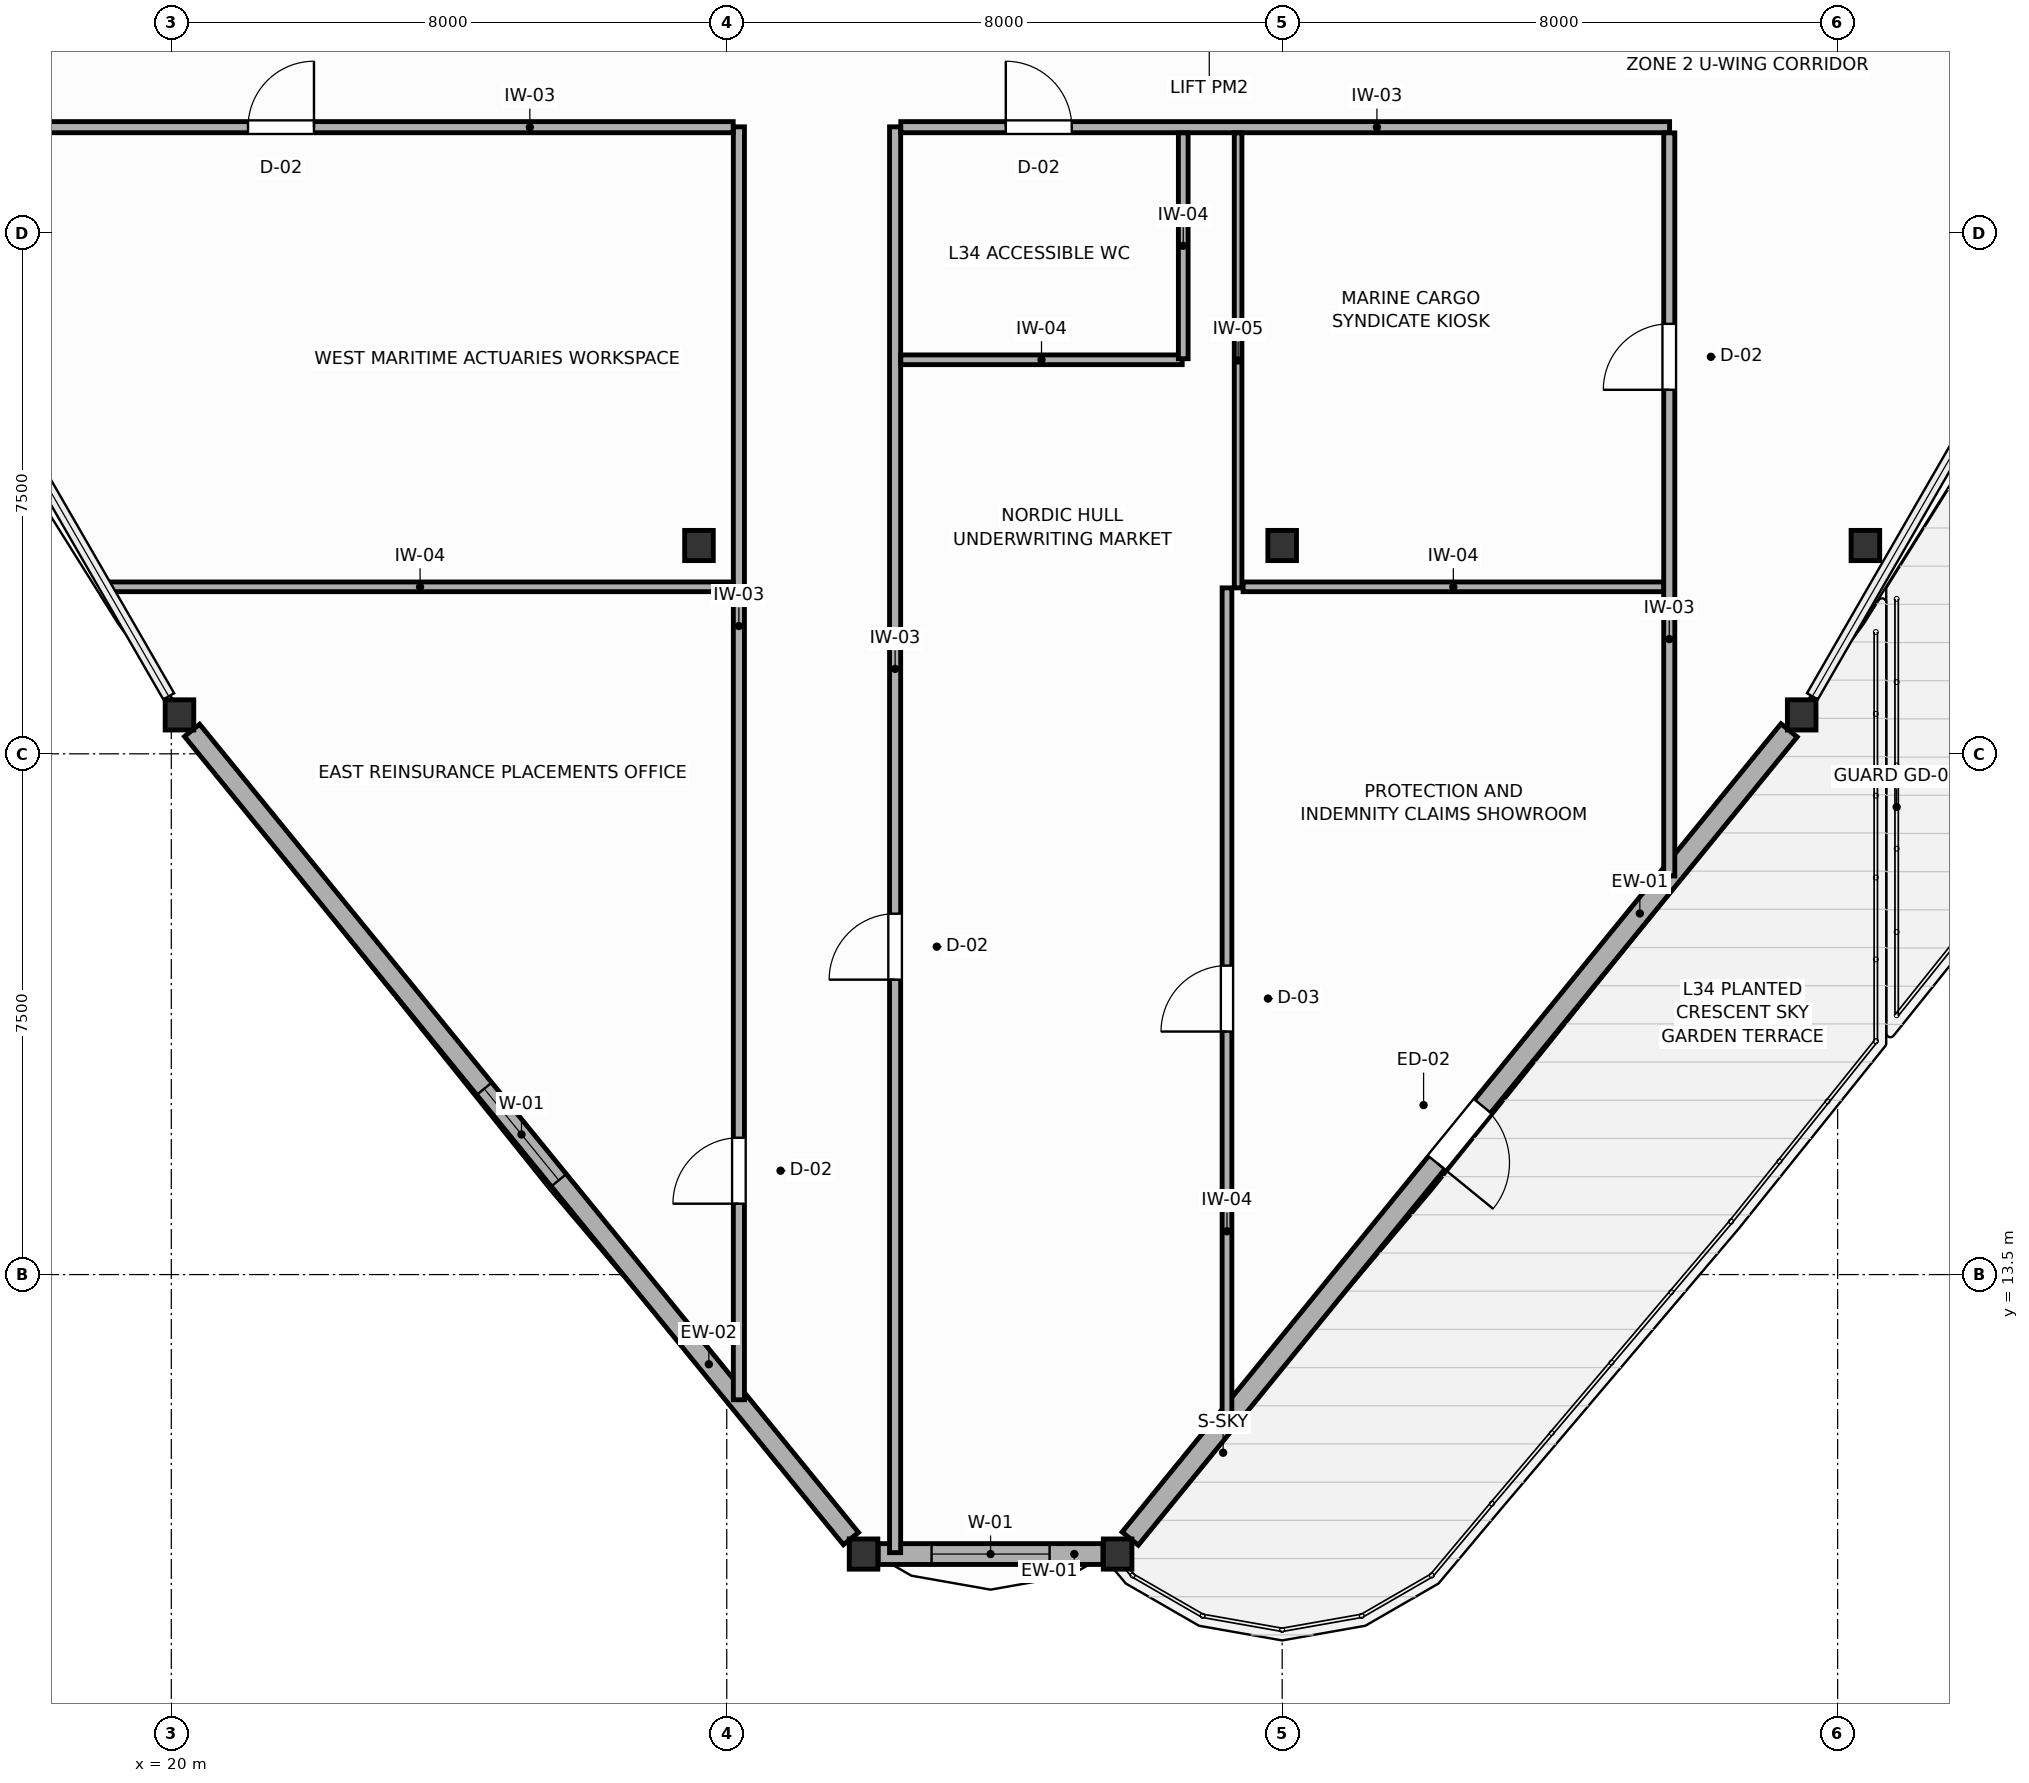
"""IFC4 building model, lengths in metres.
Left out: names, types, materials, properties, quantities, classifications, styles, units other than length and angle.
Written with IfcOpenShell. Run it as: python <this file> out.ifc"""

import sys

from ifc_helpers import new_model, si_unit, direction, frame, frame_2d, origin, origin_2d, place, context, subcontext, project, spatial, rectangle, i_section, extrude, source, transform, mapped, element, fill, save


model = new_model("IFC4")
c1 = context("Model", 3, precision=1e-05, world=origin(), true_north=direction((0.0, 1.0)))
c2 = subcontext(c1, "Body", "Model", "MODEL_VIEW")
j1 = project(units=[si_unit("LENGTHUNIT", "METRE"), si_unit("PLANEANGLEUNIT", "RADIAN")], contexts=[c1])
p1 = place(None, origin())
s1 = spatial("IfcSite", under=j1, at=p1, CompositionType="ELEMENT")
p2 = place(p1, origin())
s2 = spatial("IfcBuilding", under=s1, at=p2, CompositionType="ELEMENT")
p3 = place(p2, frame((0.0, 0.0, 136.2)))
s3 = spatial("IfcBuildingStorey", under=s2, at=p3, CompositionType="ELEMENT", Elevation=136.2)
m1 = source(origin(), c2, "Body", "SweptSolid", [
    extrude(i_section(OverallWidth=0.412, OverallDepth=0.435, WebThickness=0.033, FlangeThickness=0.053, FilletRadius=0.015, at=origin_2d()), origin(), (0.0, 0.0, 1.0), 3.6),
])
for number, where, z_axis, x_axis in (
    (1, (27.6, 24.0, 0.0), (0.0, 0.0, 1.0), (1.0, 0.0, 0.0)),
    (2, (44.4, 24.0, 0.0), (0.0, 0.0, 1.0), (1.0, 0.0, 0.0)),
    (3, (36.0, 24.0, 0.0), (0.0, 0.0, 1.0), (1.0, 0.0, 0.0)),
    (4, (20.118, 21.561, 0.0), (0.0, 0.0, 1.0), (1.0, 0.0, 0.0)),
    (5, (29.97, 9.475, 0.0), (0.0, 0.0, 1.0), (1.0, 0.0, 0.0)),
    (6, (33.63, 9.475, 0.0), (0.0, 0.0, 1.0), (1.0, 0.0, 0.0)),
    (7, (43.482, 21.561, 0.0), (0.0, 0.0, 1.0), (1.0, 0.0, 0.0)),
):
    element("IfcColumn", number, at=place(p3, frame(where, z_axis=z_axis, x_axis=x_axis)), inside=s3, PredefinedType="COLUMN", context=c2, shape_type="MappedRepresentation", body=[
        mapped(m1, transform((0.0, 0.0, 0.0), scale=1.0)),
    ])
p4 = place(p3, frame((20.299, 21.338, 0.0), z_axis=(0.0, 0.0, 1.0), x_axis=(0.631872666528, -0.775072211665, 0.0)))
e8 = element("IfcWall", 8, at=p4, inside=s3, PredefinedType="SOLIDWALL", context=c2, shape_type="SweptSolid", body=[
    extrude(rectangle(XDim=15.019, YDim=0.28, at=frame_2d((7.509, 0.0))), origin(), (0.0, 0.0, 1.0), 3.0),
])
p5 = place(p4, frame((6.659, 0.0, 0.75)))
e9 = element("IfcOpeningElement", 9, at=p5, cuts=e8, PredefinedType="OPENING", context=c2, shape_type="SweptSolid", body=[
    extrude(rectangle(XDim=1.7, YDim=1.75, at=frame_2d((0.85, 0.875))), frame((0.0, 0.15, 0.0), z_axis=(0.0, -1.0, 0.0), x_axis=(1.0, 0.0, 0.0)), (0.0, 0.0, 1.0), 0.3),
])
p6 = place(p3, frame((30.181, 9.475, 0.0), z_axis=(0.0, 0.0, 1.0), x_axis=(1.0, 0.0, 0.0)))
e10 = element("IfcWall", 10, at=p6, inside=s3, PredefinedType="SOLIDWALL", context=c2, shape_type="SweptSolid", body=[
    extrude(rectangle(XDim=3.237, YDim=0.3, at=frame_2d((1.619, 0.0))), origin(), (0.0, 0.0, 1.0), 3.0),
])
p7 = place(p6, frame((0.769, 0.0, 0.75)))
e11 = element("IfcOpeningElement", 11, at=p7, cuts=e10, PredefinedType="OPENING", context=c2, shape_type="SweptSolid", body=[
    extrude(rectangle(XDim=1.7, YDim=1.75, at=frame_2d((0.85, 0.875))), frame((0.0, 0.16, 0.0), z_axis=(0.0, -1.0, 0.0), x_axis=(1.0, 0.0, 0.0)), (0.0, 0.0, 1.0), 0.32),
])
p8 = place(p3, frame((33.811, 9.698, 0.0), z_axis=(0.0, 0.0, 1.0), x_axis=(0.631882431987, 0.775064250334, 0.0)))
e12 = element("IfcWall", 12, at=p8, inside=s3, PredefinedType="SOLIDWALL", context=c2, shape_type="SweptSolid", body=[
    extrude(rectangle(XDim=15.019, YDim=0.3, at=frame_2d((7.509, 0.0))), origin(), (0.0, 0.0, 1.0), 3.0),
])
p9 = place(p8, frame((6.984, 0.0, 0.0)))
e13 = element("IfcOpeningElement", 13, at=p9, cuts=e12, PredefinedType="OPENING", context=c2, shape_type="SweptSolid", body=[
    extrude(rectangle(XDim=1.05, YDim=2.1, at=frame_2d((0.525, 1.05))), frame((0.0, 0.16, 0.0), z_axis=(0.0, -1.0, 0.0), x_axis=(1.0, 0.0, 0.0)), (0.0, 0.0, 1.0), 0.32),
])
p10 = place(p3, frame((30.425, 9.495, 0.0), z_axis=(0.0, 0.0, 1.0), x_axis=(0.0, 1.0, 0.0)))
e14 = element("IfcWall", 14, at=p10, inside=s3, PredefinedType="PARTITIONING", context=c2, shape_type="SweptSolid", body=[
    extrude(rectangle(XDim=20.535, YDim=0.16, at=frame_2d((10.268, 0.0))), origin(), (0.0, 0.0, 1.0), 3.4),
])
p11 = place(p10, frame((8.252, 0.0, 0.0)))
e15 = element("IfcOpeningElement", 15, at=p11, cuts=e14, PredefinedType="OPENING", context=c2, shape_type="SweptSolid", body=[
    extrude(rectangle(XDim=0.95, YDim=2.05, at=frame_2d((0.475, 1.025))), frame((0.0, 0.09, 0.0), z_axis=(0.0, -1.0, 0.0), x_axis=(1.0, 0.0, 0.0)), (0.0, 0.0, 1.0), 0.18),
])
p12 = place(p3, frame((28.175, 11.697, 0.0), z_axis=(0.0, 0.0, 1.0), x_axis=(0.0, 1.0, 0.0)))
e16 = element("IfcWall", 16, at=p12, inside=s3, PredefinedType="PARTITIONING", context=c2, shape_type="SweptSolid", body=[
    extrude(rectangle(XDim=18.333, YDim=0.16, at=frame_2d((9.167, 0.0))), origin(), (0.0, 0.0, 1.0), 2.95),
])
p13 = place(p12, frame((2.824, 0.0, 0.0)))
e17 = element("IfcOpeningElement", 17, at=p13, cuts=e16, PredefinedType="OPENING", context=c2, shape_type="SweptSolid", body=[
    extrude(rectangle(XDim=0.95, YDim=2.05, at=frame_2d((0.475, 1.025))), frame((0.0, 0.09, 0.0), z_axis=(0.0, -1.0, 0.0), x_axis=(1.0, 0.0, 0.0)), (0.0, 0.0, 1.0), 0.18),
])
p14 = place(p3, frame((15.251, 30.025, 0.0), z_axis=(0.0, 0.0, 1.0), x_axis=(1.0, 0.0, 0.0)))
e18 = element("IfcWall", 18, at=p14, inside=s3, PredefinedType="PARTITIONING", context=c2, shape_type="SweptSolid", body=[
    extrude(rectangle(XDim=12.842, YDim=0.16, at=frame_2d((6.421, 0.0))), origin(), (0.0, 0.0, 1.0), 3.4),
])
p15 = place(p14, frame((5.854, 0.0, 0.0)))
e19 = element("IfcOpeningElement", 19, at=p15, cuts=e18, PredefinedType="OPENING", context=c2, shape_type="SweptSolid", body=[
    extrude(rectangle(XDim=0.95, YDim=2.05, at=frame_2d((0.475, 1.025))), frame((0.0, 0.09, 0.0), z_axis=(0.0, -1.0, 0.0), x_axis=(1.0, 0.0, 0.0)), (0.0, 0.0, 1.0), 0.18),
])
p16 = place(p3, frame((30.507, 30.025, 0.0), z_axis=(0.0, 0.0, 1.0), x_axis=(1.0, 0.0, 0.0)))
e20 = element("IfcWall", 20, at=p16, inside=s3, PredefinedType="PARTITIONING", context=c2, shape_type="SweptSolid", body=[
    extrude(rectangle(XDim=11.073, YDim=0.16, at=frame_2d((5.537, 0.0))), origin(), (0.0, 0.0, 1.0), 3.4),
])
p17 = place(p16, frame((1.512, 0.0, 0.0)))
e21 = element("IfcOpeningElement", 21, at=p17, cuts=e20, PredefinedType="OPENING", context=c2, shape_type="SweptSolid", body=[
    extrude(rectangle(XDim=0.95, YDim=2.05, at=frame_2d((0.475, 1.025))), frame((0.0, 0.09, 0.0), z_axis=(0.0, -1.0, 0.0), x_axis=(1.0, 0.0, 0.0)), (0.0, 0.0, 1.0), 0.18),
])
p18 = place(p3, frame((41.575, 19.241, 0.0), z_axis=(0.0, 0.0, 1.0), x_axis=(0.0, 1.0, 0.0)))
e22 = element("IfcWall", 22, at=p18, inside=s3, PredefinedType="PARTITIONING", context=c2, shape_type="SweptSolid", body=[
    extrude(rectangle(XDim=10.702, YDim=0.16, at=frame_2d((5.351, 0.0))), origin(), (0.0, 0.0, 1.0), 3.4),
])
p19 = place(p18, frame((7.002, 0.0, 0.0)))
e23 = element("IfcOpeningElement", 23, at=p19, cuts=e22, PredefinedType="OPENING", context=c2, shape_type="SweptSolid", body=[
    extrude(rectangle(XDim=0.95, YDim=2.05, at=frame_2d((0.475, 1.025))), frame((0.0, 0.09, 0.0), z_axis=(0.0, -1.0, 0.0), x_axis=(1.0, 0.0, 0.0)), (0.0, 0.0, 1.0), 0.18),
])
p20 = place(p3, frame((35.205, 11.427, 0.0), z_axis=(0.0, 0.0, 1.0), x_axis=(0.0, 1.0, 0.0)))
e24 = element("IfcWall", 24, at=p20, inside=s3, PredefinedType="PARTITIONING", context=c2, shape_type="SweptSolid", body=[
    extrude(rectangle(XDim=11.963, YDim=0.14, at=frame_2d((5.981, 0.0))), origin(), (0.0, 0.0, 1.0), 2.95),
])
p21 = place(p20, frame((5.573, 0.0, 0.0)))
e25 = element("IfcOpeningElement", 25, at=p21, cuts=e24, PredefinedType="OPENING", context=c2, shape_type="SweptSolid", body=[
    extrude(rectangle(XDim=0.95, YDim=2.05, at=frame_2d((0.475, 1.025))), frame((0.0, 0.08, 0.0), z_axis=(0.0, -1.0, 0.0), x_axis=(1.0, 0.0, 0.0)), (0.0, 0.0, 1.0), 0.16),
])
p22 = place(p3, frame((19.073, 23.405, 0.0), z_axis=(0.0, 0.0, 1.0), x_axis=(1.0, 0.0, 0.0)))
e26 = element("IfcWall", 26, at=p22, inside=s3, PredefinedType="PARTITIONING", context=c2, shape_type="SweptSolid", body=[
    extrude(rectangle(XDim=9.02, YDim=0.14, at=frame_2d((4.51, 0.0))), origin(), (0.0, 0.0, 1.0), 3.4),
])
p23 = place(p3, frame((35.365, 23.39, 0.0), z_axis=(0.0, 0.0, 1.0), x_axis=(0.0, 1.0, 0.0)))
e27 = element("IfcWall", 27, at=p23, inside=s3, PredefinedType="MOVABLE", context=c2, shape_type="SweptSolid", body=[
    extrude(rectangle(XDim=6.553, YDim=0.11, at=frame_2d((3.277, 0.0))), origin(), (0.0, 0.0, 1.0), 3.4),
])
p24 = place(p3, frame((35.437, 23.405, 0.0), z_axis=(0.0, 0.0, 1.0), x_axis=(1.0, 0.0, 0.0)))
e28 = element("IfcWall", 28, at=p24, inside=s3, PredefinedType="PARTITIONING", context=c2, shape_type="SweptSolid", body=[
    extrude(rectangle(XDim=6.056, YDim=0.14, at=frame_2d((3.028, 0.0))), origin(), (0.0, 0.0, 1.0), 3.4),
])
p25 = place(p3, frame((30.507, 26.675, 0.0), z_axis=(0.0, 0.0, 1.0), x_axis=(1.0, 0.0, 0.0)))
e29 = element("IfcWall", 29, at=p25, inside=s3, PredefinedType="PARTITIONING", context=c2, shape_type="SweptSolid", body=[
    extrude(rectangle(XDim=4.053, YDim=0.14, at=frame_2d((2.026, 0.0))), origin(), (0.0, 0.0, 1.0), 3.4),
])
p26 = place(p3, frame((34.575, 26.69, 0.0), z_axis=(0.0, 0.0, 1.0), x_axis=(0.0, 1.0, 0.0)))
e30 = element("IfcWall", 30, at=p26, inside=s3, PredefinedType="PARTITIONING", context=c2, shape_type="SweptSolid", body=[
    extrude(rectangle(XDim=3.253, YDim=0.14, at=frame_2d((1.626, 0.0))), origin(), (0.0, 0.0, 1.0), 3.4),
])
p27 = place(p5, origin())
e31 = element("IfcWindow", 31, at=p27, inside=s3, PartitioningType="SINGLE_PANEL", PredefinedType="WINDOW", context=c2, shape_type="SweptSolid", body=[
    extrude(rectangle(XDim=1.7, YDim=1.75, at=frame_2d((0.85, 0.875))), frame((0.0, 0.03, 0.0), z_axis=(0.0, -1.0, 0.0), x_axis=(1.0, 0.0, 0.0)), (0.0, 0.0, 1.0), 0.06),
])
fill(e9, e31)
p28 = place(p7, origin())
e32 = element("IfcWindow", 32, at=p28, inside=s3, PartitioningType="SINGLE_PANEL", PredefinedType="WINDOW", context=c2, shape_type="SweptSolid", body=[
    extrude(rectangle(XDim=1.7, YDim=1.75, at=frame_2d((0.85, 0.875))), frame((0.0, 0.03, 0.0), z_axis=(0.0, -1.0, 0.0), x_axis=(1.0, 0.0, 0.0)), (0.0, 0.0, 1.0), 0.06),
])
fill(e11, e32)
p29 = place(p9, frame((1.05, 0.0, 0.0), z_axis=(0.0, 0.0, 1.0), x_axis=(-1.0, 0.0, 0.0)))
e33 = element("IfcDoor", 33, at=p29, inside=s3, OperationType="SINGLE_SWING_RIGHT", PredefinedType="DOOR", context=c2, shape_type="SweptSolid", body=[
    extrude(rectangle(XDim=1.05, YDim=2.1, at=frame_2d((0.525, 1.05))), frame((0.0, 0.025, 0.0), z_axis=(0.0, -1.0, 0.0), x_axis=(1.0, 0.0, 0.0)), (0.0, 0.0, 1.0), 0.05),
])
fill(e13, e33)
p30 = place(p11, origin())
e34 = element("IfcDoor", 34, at=p30, inside=s3, OperationType="SINGLE_SWING_LEFT", PredefinedType="DOOR", context=c2, shape_type="SweptSolid", body=[
    extrude(rectangle(XDim=0.95, YDim=2.05, at=frame_2d((0.475, 1.025))), frame((0.0, 0.025, 0.0), z_axis=(0.0, -1.0, 0.0), x_axis=(1.0, 0.0, 0.0)), (0.0, 0.0, 1.0), 0.05),
])
fill(e15, e34)
p31 = place(p13, origin())
e35 = element("IfcDoor", 35, at=p31, inside=s3, OperationType="SINGLE_SWING_LEFT", PredefinedType="DOOR", context=c2, shape_type="SweptSolid", body=[
    extrude(rectangle(XDim=0.95, YDim=2.05, at=frame_2d((0.475, 1.025))), frame((0.0, 0.025, 0.0), z_axis=(0.0, -1.0, 0.0), x_axis=(1.0, 0.0, 0.0)), (0.0, 0.0, 1.0), 0.05),
])
fill(e17, e35)
p32 = place(p15, origin())
e36 = element("IfcDoor", 36, at=p32, inside=s3, OperationType="SINGLE_SWING_RIGHT", PredefinedType="DOOR", context=c2, shape_type="SweptSolid", body=[
    extrude(rectangle(XDim=0.95, YDim=2.05, at=frame_2d((0.475, 1.025))), frame((0.0, 0.025, 0.0), z_axis=(0.0, -1.0, 0.0), x_axis=(1.0, 0.0, 0.0)), (0.0, 0.0, 1.0), 0.05),
])
fill(e19, e36)
p33 = place(p17, origin())
e37 = element("IfcDoor", 37, at=p33, inside=s3, OperationType="SINGLE_SWING_LEFT", PredefinedType="DOOR", context=c2, shape_type="SweptSolid", body=[
    extrude(rectangle(XDim=0.95, YDim=2.05, at=frame_2d((0.475, 1.025))), frame((0.0, 0.025, 0.0), z_axis=(0.0, -1.0, 0.0), x_axis=(1.0, 0.0, 0.0)), (0.0, 0.0, 1.0), 0.05),
])
fill(e21, e37)
p34 = place(p19, origin())
e38 = element("IfcDoor", 38, at=p34, inside=s3, OperationType="SINGLE_SWING_LEFT", PredefinedType="DOOR", context=c2, shape_type="SweptSolid", body=[
    extrude(rectangle(XDim=0.95, YDim=2.05, at=frame_2d((0.475, 1.025))), frame((0.0, 0.025, 0.0), z_axis=(0.0, -1.0, 0.0), x_axis=(1.0, 0.0, 0.0)), (0.0, 0.0, 1.0), 0.05),
])
fill(e23, e38)
p35 = place(p21, origin())
e39 = element("IfcDoor", 39, at=p35, inside=s3, OperationType="SINGLE_SWING_LEFT", PredefinedType="DOOR", context=c2, shape_type="SweptSolid", body=[
    extrude(rectangle(XDim=0.95, YDim=2.05, at=frame_2d((0.475, 1.025))), frame((0.0, 0.025, 0.0), z_axis=(0.0, -1.0, 0.0), x_axis=(1.0, 0.0, 0.0)), (0.0, 0.0, 1.0), 0.05),
])
fill(e25, e39)
save(model, sys.argv[1])
